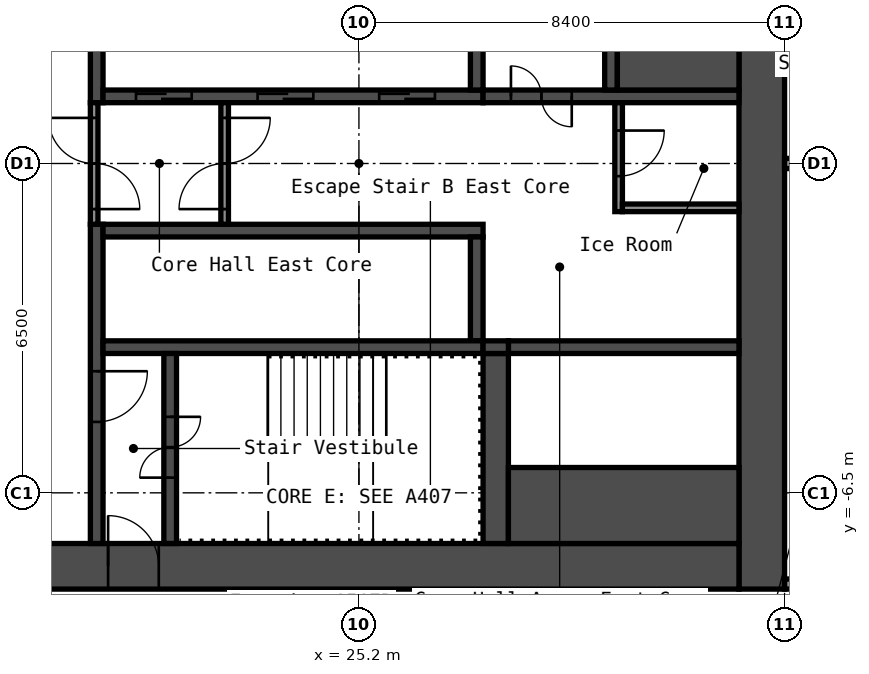
"""IFC4 building model, lengths in metres.
Left out: names, types, materials, properties, quantities, classifications, styles, units other than length and angle.
Written with IfcOpenShell. Run it as: python <this file> out.ifc"""

import sys

from ifc_helpers import new_model, si_unit, direction, frame, frame_2d, origin, place, context, subcontext, project, spatial, rectangle, extrude, element, fill, save


model = new_model("IFC4")
c1 = context("Model", 3, precision=1e-05, world=origin(), true_north=direction((0.0, 1.0)))
c2 = subcontext(c1, "Body", "Model", "MODEL_VIEW")
j1 = project(units=[si_unit("LENGTHUNIT", "METRE"), si_unit("PLANEANGLEUNIT", "RADIAN")], contexts=[c1])
p1 = place(None, origin())
s1 = spatial("IfcSite", under=j1, at=p1, CompositionType="ELEMENT")
p2 = place(p1, origin())
s2 = spatial("IfcBuilding", under=s1, at=p2, CompositionType="ELEMENT")
p3 = place(p2, frame((0.0, 0.0, 55.0)))
s3 = spatial("IfcBuildingStorey", under=s2, at=p3, CompositionType="ELEMENT", Elevation=55.0)
p4 = place(p3, frame((33.15, -8.4, 0.0), z_axis=(0.0, 0.0, 1.0), x_axis=(0.0, 1.0, 0.0)))
e1 = element("IfcWall", 1, at=p4, inside=s3, PredefinedType="SHEAR", context=c2, shape_type="SweptSolid", body=[
    extrude(rectangle(XDim=16.8, YDim=0.9, at=frame_2d((8.4, 0.0))), origin(), (0.0, 0.0, 1.0), 2.8),
])
p5 = place(p3, frame((17.7, -7.95, 0.0), z_axis=(0.0, 0.0, 1.0), x_axis=(1.0, 0.0, 0.0)))
e2 = element("IfcWall", 2, at=p5, inside=s3, PredefinedType="SHEAR", context=c2, shape_type="SweptSolid", body=[
    extrude(rectangle(XDim=15.0, YDim=0.9, at=frame_2d((7.5, 0.0))), origin(), (0.0, 0.0, 1.0), 2.8),
])
p6 = place(p5, frame((2.55, 0.0, 0.0)))
e3 = element("IfcOpeningElement", 3, at=p6, cuts=e2, PredefinedType="OPENING", context=c2, shape_type="SweptSolid", body=[
    extrude(rectangle(XDim=1.0, YDim=2.1, at=frame_2d((0.5, 1.05))), frame((0.0, 0.46, 0.0), z_axis=(0.0, -1.0, 0.0), x_axis=(1.0, 0.0, 0.0)), (0.0, 0.0, 1.0), 0.92),
])
p7 = place(p3, frame((20.025, 1.2, 0.0), z_axis=(0.0, 0.0, 1.0), x_axis=(0.0, 1.0, 0.0)))
e4 = element("IfcWall", 4, at=p7, inside=s3, PredefinedType="SHEAR", context=c2, shape_type="SweptSolid", body=[
    extrude(rectangle(XDim=6.3, YDim=0.25, at=frame_2d((3.15, 0.0))), origin(), (0.0, 0.0, 1.0), 2.8),
])
p8 = place(p3, frame((20.025, -7.5, 0.0), z_axis=(0.0, 0.0, 1.0), x_axis=(0.0, 1.0, 0.0)))
e5 = element("IfcWall", 5, at=p8, inside=s3, PredefinedType="SHEAR", context=c2, shape_type="SweptSolid", body=[
    extrude(rectangle(XDim=6.3, YDim=0.25, at=frame_2d((3.15, 0.0))), origin(), (0.0, 0.0, 1.0), 2.8),
])
p9 = place(p8, frame((2.4, 0.0, 0.0)))
e6 = element("IfcOpeningElement", 6, at=p9, cuts=e5, PredefinedType="OPENING", context=c2, shape_type="SweptSolid", body=[
    extrude(rectangle(XDim=1.0, YDim=2.1, at=frame_2d((0.5, 1.05))), frame((0.0, 0.135, 0.0), z_axis=(0.0, -1.0, 0.0), x_axis=(1.0, 0.0, 0.0)), (0.0, 0.0, 1.0), 0.27),
])
p10 = place(p3, frame((20.15, 1.325, 0.0), z_axis=(0.0, 0.0, 1.0), x_axis=(1.0, 0.0, 0.0)))
e7 = element("IfcWall", 7, at=p10, inside=s3, PredefinedType="SHEAR", context=c2, shape_type="SweptSolid", body=[
    extrude(rectangle(XDim=7.5, YDim=0.25, at=frame_2d((3.75, 0.0))), origin(), (0.0, 0.0, 1.0), 2.8),
])
p11 = place(p10, frame((0.65, 0.0, 0.0)))
e8 = element("IfcOpeningElement", 8, at=p11, cuts=e7, PredefinedType="OPENING", context=c2, shape_type="SweptSolid", body=[
    extrude(rectangle(XDim=1.1, YDim=2.1, at=frame_2d((0.55, 1.05))), frame((0.0, 0.135, 0.0), z_axis=(0.0, -1.0, 0.0), x_axis=(1.0, 0.0, 0.0)), (0.0, 0.0, 1.0), 0.27),
])
p12 = place(p10, frame((3.05, 0.0, 0.0)))
e9 = element("IfcOpeningElement", 9, at=p12, cuts=e7, PredefinedType="OPENING", context=c2, shape_type="SweptSolid", body=[
    extrude(rectangle(XDim=1.1, YDim=2.1, at=frame_2d((0.55, 1.05))), frame((0.0, 0.135, 0.0), z_axis=(0.0, -1.0, 0.0), x_axis=(1.0, 0.0, 0.0)), (0.0, 0.0, 1.0), 0.27),
])
p13 = place(p10, frame((5.45, 0.0, 0.0)))
e10 = element("IfcOpeningElement", 10, at=p13, cuts=e7, PredefinedType="OPENING", context=c2, shape_type="SweptSolid", body=[
    extrude(rectangle(XDim=1.1, YDim=2.1, at=frame_2d((0.55, 1.05))), frame((0.0, 0.135, 0.0), z_axis=(0.0, -1.0, 0.0), x_axis=(1.0, 0.0, 0.0)), (0.0, 0.0, 1.0), 0.27),
])
p14 = place(p3, frame((27.525, 1.45, 0.0), z_axis=(0.0, 0.0, 1.0), x_axis=(0.0, 1.0, 0.0)))
e11 = element("IfcWall", 11, at=p14, inside=s3, PredefinedType="SHEAR", context=c2, shape_type="SweptSolid", body=[
    extrude(rectangle(XDim=2.05, YDim=0.25, at=frame_2d((1.025, 0.0))), origin(), (0.0, 0.0, 1.0), 2.8),
])
p15 = place(p3, frame((27.65, 1.325, 0.0), z_axis=(0.0, 0.0, 1.0), x_axis=(1.0, 0.0, 0.0)))
e12 = element("IfcWall", 12, at=p15, inside=s3, PredefinedType="SHEAR", context=c2, shape_type="SweptSolid", body=[
    extrude(rectangle(XDim=5.05, YDim=0.25, at=frame_2d((2.525, 0.0))), origin(), (0.0, 0.0, 1.0), 2.8),
])
p16 = place(p15, frame((0.55, 0.0, 0.0)))
e13 = element("IfcOpeningElement", 13, at=p16, cuts=e12, PredefinedType="OPENING", context=c2, shape_type="SweptSolid", body=[
    extrude(rectangle(XDim=1.2, YDim=2.1, at=frame_2d((0.6, 1.05))), frame((0.0, 0.135, 0.0), z_axis=(0.0, -1.0, 0.0), x_axis=(1.0, 0.0, 0.0)), (0.0, 0.0, 1.0), 0.27),
])
p17 = place(p3, frame((30.175, 1.45, 0.0), z_axis=(0.0, 0.0, 1.0), x_axis=(0.0, 1.0, 0.0)))
e14 = element("IfcWall", 14, at=p17, inside=s3, PredefinedType="SHEAR", context=c2, shape_type="SweptSolid", body=[
    extrude(rectangle(XDim=6.05, YDim=0.25, at=frame_2d((3.025, 0.0))), origin(), (0.0, 0.0, 1.0), 2.8),
])
p18 = place(p17, frame((2.625, 0.0, 0.0)))
e15 = element("IfcOpeningElement", 15, at=p18, cuts=e14, PredefinedType="OPENING", context=c2, shape_type="SweptSolid", body=[
    extrude(rectangle(XDim=1.1, YDim=2.1, at=frame_2d((0.55, 1.05))), frame((0.0, 0.135, 0.0), z_axis=(0.0, -1.0, 0.0), x_axis=(1.0, 0.0, 0.0)), (0.0, 0.0, 1.0), 0.27),
])
p19 = place(p3, frame((30.3, 2.375, 0.0), z_axis=(0.0, 0.0, 1.0), x_axis=(1.0, 0.0, 0.0)))
e16 = element("IfcWall", 16, at=p19, inside=s3, PredefinedType="SHEAR", context=c2, shape_type="SweptSolid", body=[
    extrude(rectangle(XDim=2.4, YDim=1.85, at=frame_2d((1.2, 0.0))), origin(), (0.0, 0.0, 1.0), 2.8),
])
p20 = place(p3, frame((20.15, -1.325, 0.0), z_axis=(0.0, 0.0, 1.0), x_axis=(1.0, 0.0, 0.0)))
e17 = element("IfcWall", 17, at=p20, inside=s3, PredefinedType="SHEAR", context=c2, shape_type="SweptSolid", body=[
    extrude(rectangle(XDim=7.5, YDim=0.25, at=frame_2d((3.75, 0.0))), origin(), (0.0, 0.0, 1.0), 2.8),
])
p21 = place(p3, frame((27.525, -3.5, 0.0), z_axis=(0.0, 0.0, 1.0), x_axis=(0.0, 1.0, 0.0)))
e18 = element("IfcWall", 18, at=p21, inside=s3, PredefinedType="SHEAR", context=c2, shape_type="SweptSolid", body=[
    extrude(rectangle(XDim=2.05, YDim=0.25, at=frame_2d((1.025, 0.0))), origin(), (0.0, 0.0, 1.0), 2.8),
])
p22 = place(p3, frame((20.15, -3.625, 0.0), z_axis=(0.0, 0.0, 1.0), x_axis=(1.0, 0.0, 0.0)))
e19 = element("IfcWall", 19, at=p22, inside=s3, PredefinedType="SHEAR", context=c2, shape_type="SweptSolid", body=[
    extrude(rectangle(XDim=7.5, YDim=0.25, at=frame_2d((3.75, 0.0))), origin(), (0.0, 0.0, 1.0), 2.8),
])
p23 = place(p3, frame((21.475, -7.5, 0.0), z_axis=(0.0, 0.0, 1.0), x_axis=(0.0, 1.0, 0.0)))
e20 = element("IfcWall", 20, at=p23, inside=s3, PredefinedType="SHEAR", context=c2, shape_type="SweptSolid", body=[
    extrude(rectangle(XDim=3.75, YDim=0.25, at=frame_2d((1.875, 0.0))), origin(), (0.0, 0.0, 1.0), 2.8),
])
p24 = place(p23, frame((1.3, 0.0, 0.0)))
e21 = element("IfcOpeningElement", 21, at=p24, cuts=e20, PredefinedType="OPENING", context=c2, shape_type="SweptSolid", body=[
    extrude(rectangle(XDim=1.2, YDim=2.1, at=frame_2d((0.6, 1.05))), frame((0.0, 0.135, 0.0), z_axis=(0.0, -1.0, 0.0), x_axis=(1.0, 0.0, 0.0)), (0.0, 0.0, 1.0), 0.27),
])
p25 = place(p3, frame((27.9, -7.5, 0.0), z_axis=(0.0, 0.0, 1.0), x_axis=(0.0, 1.0, 0.0)))
e22 = element("IfcWall", 22, at=p25, inside=s3, PredefinedType="SHEAR", context=c2, shape_type="SweptSolid", body=[
    extrude(rectangle(XDim=3.75, YDim=0.5, at=frame_2d((1.875, 0.0))), origin(), (0.0, 0.0, 1.0), 2.8),
])
p26 = place(p3, frame((28.15, -3.625, 0.0), z_axis=(0.0, 0.0, 1.0), x_axis=(1.0, 0.0, 0.0)))
e23 = element("IfcWall", 23, at=p26, inside=s3, PredefinedType="SHEAR", context=c2, shape_type="SweptSolid", body=[
    extrude(rectangle(XDim=4.55, YDim=0.25, at=frame_2d((2.275, 0.0))), origin(), (0.0, 0.0, 1.0), 2.8),
])
p27 = place(p3, frame((28.15, -6.75, 0.0), z_axis=(0.0, 0.0, 1.0), x_axis=(1.0, 0.0, 0.0)))
e24 = element("IfcWall", 24, at=p27, inside=s3, PredefinedType="SHEAR", context=c2, shape_type="SweptSolid", body=[
    extrude(rectangle(XDim=4.55, YDim=1.5, at=frame_2d((2.275, 0.0))), origin(), (0.0, 0.0, 1.0), 2.8),
])
p28 = place(p3, frame((27.65, -3.625, 0.0), z_axis=(0.0, 0.0, 1.0), x_axis=(1.0, 0.0, 0.0)))
e25 = element("IfcWall", 25, at=p28, inside=s3, PredefinedType="SHEAR", context=c2, shape_type="SweptSolid", body=[
    extrude(rectangle(XDim=0.5, YDim=0.25, at=frame_2d((0.25, 0.0))), origin(), (0.0, 0.0, 1.0), 2.8),
])
p29 = place(p3, frame((19.975, -1.2, 0.0), z_axis=(0.0, 0.0, 1.0), x_axis=(0.0, 1.0, 0.0)))
e26 = element("IfcWall", 26, at=p29, inside=s3, PredefinedType="PARTITIONING", context=c2, shape_type="SweptSolid", body=[
    extrude(rectangle(XDim=2.4, YDim=0.15, at=frame_2d((1.2, 0.0))), origin(), (0.0, 0.0, 1.0), 2.8),
])
p30 = place(p29, frame((0.3, 0.0, 0.0)))
e27 = element("IfcOpeningElement", 27, at=p30, cuts=e26, PredefinedType="OPENING", context=c2, shape_type="SweptSolid", body=[
    extrude(rectangle(XDim=1.8, YDim=2.1, at=frame_2d((0.9, 1.05))), frame((0.0, 0.085, 0.0), z_axis=(0.0, -1.0, 0.0), x_axis=(1.0, 0.0, 0.0)), (0.0, 0.0, 1.0), 0.17),
])
p31 = place(p3, frame((22.55, -1.2, 0.0), z_axis=(0.0, 0.0, 1.0), x_axis=(0.0, 1.0, 0.0)))
e28 = element("IfcWall", 28, at=p31, inside=s3, PredefinedType="PARTITIONING", context=c2, shape_type="SweptSolid", body=[
    extrude(rectangle(XDim=2.4, YDim=0.15, at=frame_2d((1.2, 0.0))), origin(), (0.0, 0.0, 1.0), 2.8),
])
p32 = place(p31, frame((0.3, 0.0, 0.0)))
e29 = element("IfcOpeningElement", 29, at=p32, cuts=e28, PredefinedType="OPENING", context=c2, shape_type="SweptSolid", body=[
    extrude(rectangle(XDim=1.8, YDim=2.1, at=frame_2d((0.9, 1.05))), frame((0.0, 0.085, 0.0), z_axis=(0.0, -1.0, 0.0), x_axis=(1.0, 0.0, 0.0)), (0.0, 0.0, 1.0), 0.17),
])
p33 = place(p3, frame((30.325, -0.95, 0.0), z_axis=(0.0, 0.0, 1.0), x_axis=(0.0, 1.0, 0.0)))
e30 = element("IfcWall", 30, at=p33, inside=s3, PredefinedType="PARTITIONING", context=c2, shape_type="SweptSolid", body=[
    extrude(rectangle(XDim=2.15, YDim=0.15, at=frame_2d((1.075, 0.0))), origin(), (0.0, 0.0, 1.0), 2.8),
])
p34 = place(p33, frame((0.7, 0.0, 0.0)))
e31 = element("IfcOpeningElement", 31, at=p34, cuts=e30, PredefinedType="OPENING", context=c2, shape_type="SweptSolid", body=[
    extrude(rectangle(XDim=0.9, YDim=2.1, at=frame_2d((0.45, 1.05))), frame((0.0, 0.085, 0.0), z_axis=(0.0, -1.0, 0.0), x_axis=(1.0, 0.0, 0.0)), (0.0, 0.0, 1.0), 0.17),
])
p35 = place(p3, frame((30.4, -0.875, 0.0), z_axis=(0.0, 0.0, 1.0), x_axis=(1.0, 0.0, 0.0)))
e32 = element("IfcWall", 32, at=p35, inside=s3, PredefinedType="PARTITIONING", context=c2, shape_type="SweptSolid", body=[
    extrude(rectangle(XDim=2.3, YDim=0.15, at=frame_2d((1.15, 0.0))), origin(), (0.0, 0.0, 1.0), 2.8),
])
p36 = place(p3, frame((33.6, -8.3, 0.0), z_axis=(0.0, 0.0, 1.0), x_axis=(1.0, 0.0, 0.0)))
e33 = element("IfcWall", 33, at=p36, inside=s3, PredefinedType="PARTITIONING", context=c2, shape_type="SweptSolid", body=[
    extrude(rectangle(XDim=15.0, YDim=0.2, at=frame_2d((7.5, 0.0))), origin(), (0.0, 0.0, 1.0), 2.8),
])
p37 = place(p36, frame((2.0, 0.0, 0.0)))
e34 = element("IfcOpeningElement", 34, at=p37, cuts=e33, PredefinedType="OPENING", context=c2, shape_type="SweptSolid", body=[
    extrude(rectangle(XDim=1.0, YDim=2.1, at=frame_2d((0.5, 1.05))), frame((0.0, 0.11, 0.0), z_axis=(0.0, -1.0, 0.0), x_axis=(1.0, 0.0, 0.0)), (0.0, 0.0, 1.0), 0.22),
])
p38 = place(p36, frame((12.9, 0.0, 0.0)))
e35 = element("IfcOpeningElement", 35, at=p38, cuts=e33, PredefinedType="OPENING", context=c2, shape_type="SweptSolid", body=[
    extrude(rectangle(XDim=1.0, YDim=2.1, at=frame_2d((0.5, 1.05))), frame((0.0, 0.11, 0.0), z_axis=(0.0, -1.0, 0.0), x_axis=(1.0, 0.0, 0.0)), (0.0, 0.0, 1.0), 0.22),
])
p39 = place(p3, frame((33.6, 0.0, 0.0), z_axis=(0.0, 0.0, 1.0), x_axis=(1.0, 0.0, 0.0)))
e36 = element("IfcWall", 36, at=p39, inside=s3, PredefinedType="PARTITIONING", context=c2, shape_type="SweptSolid", body=[
    extrude(rectangle(XDim=14.9, YDim=0.2, at=frame_2d((7.45, 0.0))), origin(), (0.0, 0.0, 1.0), 2.8),
])
p40 = place(p6, origin())
e37 = element("IfcDoor", 37, at=p40, inside=s3, OperationType="SINGLE_SWING_RIGHT", PredefinedType="DOOR", context=c2, shape_type="SweptSolid", body=[
    extrude(rectangle(XDim=1.0, YDim=2.1, at=frame_2d((0.5, 1.05))), frame((0.0, 0.025, 0.0), z_axis=(0.0, -1.0, 0.0), x_axis=(1.0, 0.0, 0.0)), (0.0, 0.0, 1.0), 0.05),
])
fill(e3, e37)
p41 = place(p24, origin())
e38 = element("IfcDoor", 38, at=p41, inside=s3, OperationType="DOUBLE_DOOR_SINGLE_SWING", PredefinedType="DOOR", context=c2, shape_type="SweptSolid", body=[
    extrude(rectangle(XDim=1.2, YDim=2.1, at=frame_2d((0.6, 1.05))), frame((0.0, 0.025, 0.0), z_axis=(0.0, -1.0, 0.0), x_axis=(1.0, 0.0, 0.0)), (0.0, 0.0, 1.0), 0.05),
])
fill(e21, e38)
p42 = place(p9, origin())
e39 = element("IfcDoor", 39, at=p42, inside=s3, OperationType="SINGLE_SWING_RIGHT", PredefinedType="DOOR", context=c2, shape_type="SweptSolid", body=[
    extrude(rectangle(XDim=1.0, YDim=2.1, at=frame_2d((0.5, 1.05))), frame((0.0, 0.025, 0.0), z_axis=(0.0, -1.0, 0.0), x_axis=(1.0, 0.0, 0.0)), (0.0, 0.0, 1.0), 0.05),
])
fill(e6, e39)
p43 = place(p16, origin())
e40 = element("IfcDoor", 40, at=p43, inside=s3, OperationType="DOUBLE_DOOR_SINGLE_SWING", PredefinedType="DOOR", context=c2, shape_type="SweptSolid", body=[
    extrude(rectangle(XDim=1.2, YDim=2.1, at=frame_2d((0.6, 1.05))), frame((0.0, 0.025, 0.0), z_axis=(0.0, -1.0, 0.0), x_axis=(1.0, 0.0, 0.0)), (0.0, 0.0, 1.0), 0.05),
])
fill(e13, e40)
p44 = place(p30, origin())
e41 = element("IfcDoor", 41, at=p44, inside=s3, OperationType="DOUBLE_DOOR_SINGLE_SWING", PredefinedType="DOOR", context=c2, shape_type="SweptSolid", body=[
    extrude(rectangle(XDim=1.8, YDim=2.1, at=frame_2d((0.9, 1.05))), frame((0.0, 0.025, 0.0), z_axis=(0.0, -1.0, 0.0), x_axis=(1.0, 0.0, 0.0)), (0.0, 0.0, 1.0), 0.05),
])
fill(e27, e41)
p45 = place(p32, origin())
e42 = element("IfcDoor", 42, at=p45, inside=s3, OperationType="DOUBLE_DOOR_SINGLE_SWING", PredefinedType="DOOR", context=c2, shape_type="SweptSolid", body=[
    extrude(rectangle(XDim=1.8, YDim=2.1, at=frame_2d((0.9, 1.05))), frame((0.0, 0.025, 0.0), z_axis=(0.0, -1.0, 0.0), x_axis=(1.0, 0.0, 0.0)), (0.0, 0.0, 1.0), 0.05),
])
fill(e29, e42)
p46 = place(p34, origin())
e43 = element("IfcDoor", 43, at=p46, inside=s3, OperationType="SINGLE_SWING_RIGHT", PredefinedType="DOOR", context=c2, shape_type="SweptSolid", body=[
    extrude(rectangle(XDim=0.9, YDim=2.1, at=frame_2d((0.45, 1.05))), frame((0.0, 0.025, 0.0), z_axis=(0.0, -1.0, 0.0), x_axis=(1.0, 0.0, 0.0)), (0.0, 0.0, 1.0), 0.05),
])
fill(e31, e43)
p47 = place(p11, origin())
e44 = element("IfcDoor", 44, at=p47, inside=s3, OperationType="DOUBLE_DOOR_SLIDING", PredefinedType="DOOR", context=c2, shape_type="SweptSolid", body=[
    extrude(rectangle(XDim=1.1, YDim=2.1, at=frame_2d((0.55, 1.05))), frame((0.0, 0.025, 0.0), z_axis=(0.0, -1.0, 0.0), x_axis=(1.0, 0.0, 0.0)), (0.0, 0.0, 1.0), 0.05),
])
fill(e8, e44)
p48 = place(p12, origin())
e45 = element("IfcDoor", 45, at=p48, inside=s3, OperationType="DOUBLE_DOOR_SLIDING", PredefinedType="DOOR", context=c2, shape_type="SweptSolid", body=[
    extrude(rectangle(XDim=1.1, YDim=2.1, at=frame_2d((0.55, 1.05))), frame((0.0, 0.025, 0.0), z_axis=(0.0, -1.0, 0.0), x_axis=(1.0, 0.0, 0.0)), (0.0, 0.0, 1.0), 0.05),
])
fill(e9, e45)
p49 = place(p13, origin())
e46 = element("IfcDoor", 46, at=p49, inside=s3, OperationType="DOUBLE_DOOR_SLIDING", PredefinedType="DOOR", context=c2, shape_type="SweptSolid", body=[
    extrude(rectangle(XDim=1.1, YDim=2.1, at=frame_2d((0.55, 1.05))), frame((0.0, 0.025, 0.0), z_axis=(0.0, -1.0, 0.0), x_axis=(1.0, 0.0, 0.0)), (0.0, 0.0, 1.0), 0.05),
])
fill(e10, e46)
save(model, sys.argv[1])
